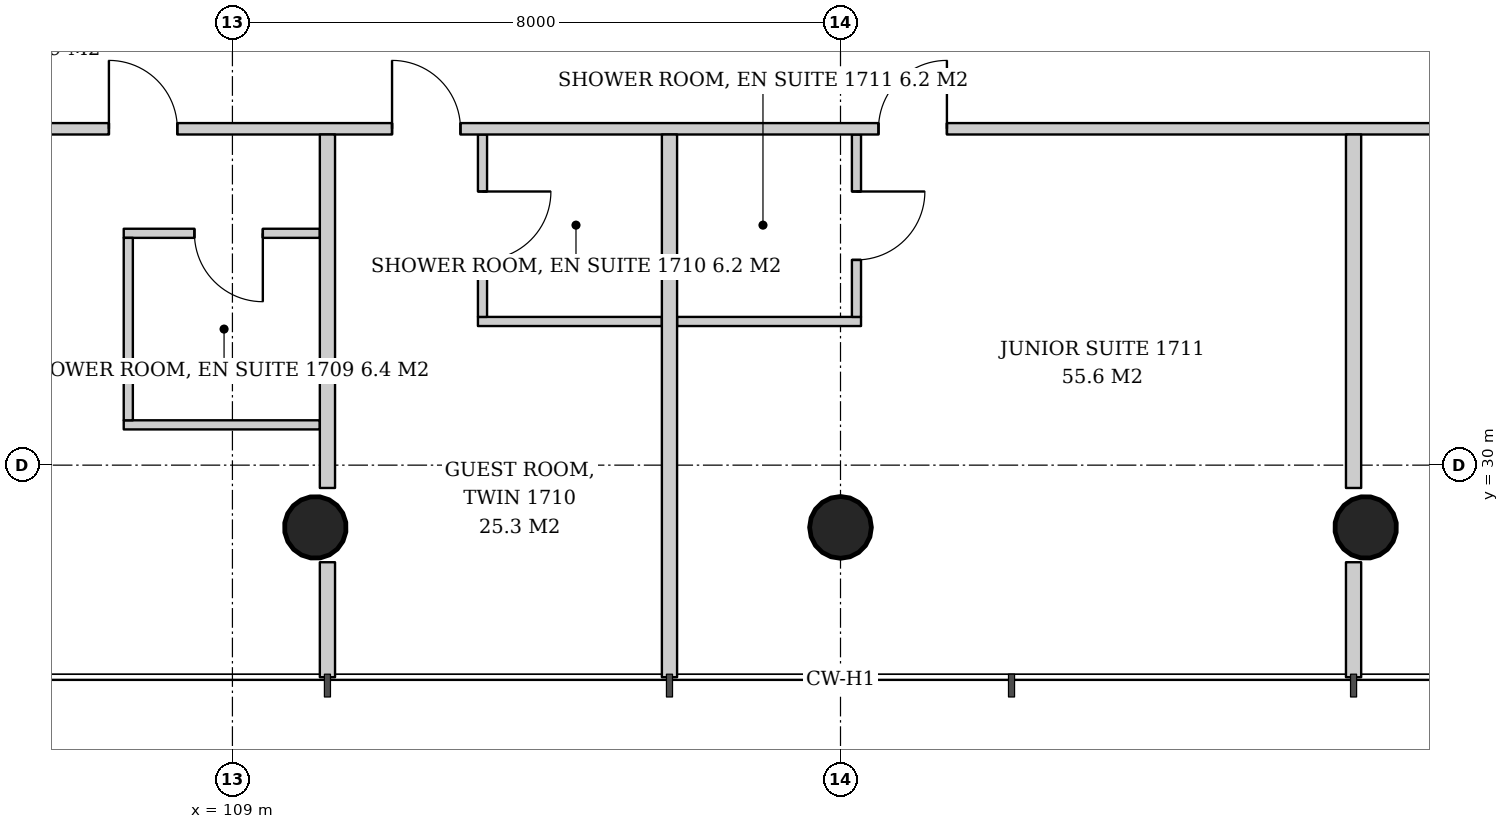
"""IFC4 building model, lengths in metres.
Left out: names, types, materials, properties, quantities, classifications, styles, units other than length and angle.
Written with IfcOpenShell. Run it as: python <this file> out.ifc"""

import sys

from ifc_helpers import new_model, si_unit, direction, frame, frame_2d, origin, origin_2d, place, context, subcontext, project, spatial, rectangle, hollow_circle, extrude, element, fill, save


model = new_model("IFC4")
c1 = context("Model", 3, precision=1e-05, world=origin(), true_north=direction((0.0, 1.0)))
c2 = subcontext(c1, "Body", "Model", "MODEL_VIEW")
j1 = project(units=[si_unit("LENGTHUNIT", "METRE"), si_unit("PLANEANGLEUNIT", "RADIAN")], contexts=[c1])
p1 = place(None, origin())
s1 = spatial("IfcSite", under=j1, at=p1, CompositionType="ELEMENT")
p2 = place(p1, origin())
s2 = spatial("IfcBuilding", under=s1, at=p2, CompositionType="ELEMENT")
p3 = place(p2, frame((0.0, 0.0, 70.4)))
s3 = spatial("IfcBuildingStorey", under=s2, at=p3, CompositionType="ELEMENT", Elevation=70.4)
p4 = place(p3, frame((110.065, 29.129, 0.0), z_axis=(0.021497706284, 0.043059584825, 0.998841188968), x_axis=(-0.894693706707, 0.446680166538, 0.0)))
e1 = element("IfcColumn", 1, at=p4, inside=s3, PredefinedType="COLUMN", context=c2, shape_type="SweptSolid", body=[
    extrude(hollow_circle(Radius=0.406, WallThickness=0.03, at=origin_2d()), origin(), (0.0, 0.0, 1.0), 3.804),
])
p5 = place(p3, frame((117.0, 29.129, 0.0), z_axis=(0.0, 0.043069538298, 0.999072076915), x_axis=(-1.0, 0.0, 0.0)))
e2 = element("IfcColumn", 2, at=p5, inside=s3, PredefinedType="COLUMN", context=c2, shape_type="SweptSolid", body=[
    extrude(hollow_circle(Radius=0.406, WallThickness=0.03, at=origin_2d()), origin(), (0.0, 0.0, 1.0), 3.803),
])
p6 = place(p3, frame((123.935, 29.129, 0.0), z_axis=(-0.021497706284, 0.043059584825, 0.998841188968), x_axis=(-0.894693706707, -0.446680166538, 0.0)))
e3 = element("IfcColumn", 3, at=p6, inside=s3, PredefinedType="COLUMN", context=c2, shape_type="SweptSolid", body=[
    extrude(hollow_circle(Radius=0.406, WallThickness=0.03, at=origin_2d()), origin(), (0.0, 0.0, 1.0), 3.804),
])
p7 = place(p3, frame((110.15, 33.05, 0.0), z_axis=(0.0, 0.0, 1.0), x_axis=(-1.0, 0.0, 0.0)))
e4 = element("IfcWall", 4, at=p7, inside=s3, PredefinedType="PARTITIONING", context=c2, shape_type="SweptSolid", body=[
    extrude(rectangle(XDim=2.58, YDim=0.12, at=frame_2d((1.29, 0.0))), origin(), (0.0, 0.0, 1.0), 2.8),
])
p8 = place(p7, frame((0.75, 0.0, 0.0)))
e5 = element("IfcOpeningElement", 5, at=p8, cuts=e4, PredefinedType="OPENING", context=c2, shape_type="SweptSolid", body=[
    extrude(rectangle(XDim=0.9, YDim=2.1, at=frame_2d((0.45, 1.05))), frame((0.0, 0.07, 0.0), z_axis=(0.0, -1.0, 0.0), x_axis=(1.0, 0.0, 0.0)), (0.0, 0.0, 1.0), 0.14),
])
p9 = place(p3, frame((110.15, 30.53, 0.0), z_axis=(0.0, 0.0, 1.0), x_axis=(-1.0, 0.0, 0.0)))
e6 = element("IfcWall", 6, at=p9, inside=s3, PredefinedType="PARTITIONING", context=c2, shape_type="SweptSolid", body=[
    extrude(rectangle(XDim=2.58, YDim=0.12, at=frame_2d((1.29, 0.0))), origin(), (0.0, 0.0, 1.0), 2.8),
])
p10 = place(p3, frame((107.63, 32.99, 0.0), z_axis=(0.0, 0.0, 1.0), x_axis=(0.0, -1.0, 0.0)))
e7 = element("IfcWall", 7, at=p10, inside=s3, PredefinedType="PARTITIONING", context=c2, shape_type="SweptSolid", body=[
    extrude(rectangle(XDim=2.4, YDim=0.12, at=frame_2d((1.2, 0.0))), origin(), (0.0, 0.0, 1.0), 2.8),
])
p11 = place(p3, frame((112.23, 31.89, 0.0), z_axis=(0.0, 0.0, 1.0), x_axis=(1.0, 0.0, 0.0)))
e8 = element("IfcWall", 8, at=p11, inside=s3, PredefinedType="PARTITIONING", context=c2, shape_type="SweptSolid", body=[
    extrude(rectangle(XDim=2.42, YDim=0.12, at=frame_2d((1.21, 0.0))), origin(), (0.0, 0.0, 1.0), 2.847),
])
p12 = place(p3, frame((112.29, 34.35, 0.0), z_axis=(0.0, 0.0, 1.0), x_axis=(0.0, -1.0, 0.0)))
e9 = element("IfcWall", 9, at=p12, inside=s3, PredefinedType="PARTITIONING", context=c2, shape_type="SweptSolid", body=[
    extrude(rectangle(XDim=2.4, YDim=0.12, at=frame_2d((1.2, 0.0))), origin(), (0.0, 0.0, 1.0), 2.847),
])
p13 = place(p12, frame((0.75, 0.0, 0.0)))
e10 = element("IfcOpeningElement", 10, at=p13, cuts=e9, PredefinedType="OPENING", context=c2, shape_type="SweptSolid", body=[
    extrude(rectangle(XDim=0.9, YDim=2.1, at=frame_2d((0.45, 1.05))), frame((0.0, 0.07, 0.0), z_axis=(0.0, -1.0, 0.0), x_axis=(1.0, 0.0, 0.0)), (0.0, 0.0, 1.0), 0.14),
])
p14 = place(p3, frame((114.85, 31.89, 0.0), z_axis=(0.0, 0.0, 1.0), x_axis=(1.0, 0.0, 0.0)))
e11 = element("IfcWall", 11, at=p14, inside=s3, PredefinedType="PARTITIONING", context=c2, shape_type="SweptSolid", body=[
    extrude(rectangle(XDim=2.42, YDim=0.12, at=frame_2d((1.21, 0.0))), origin(), (0.0, 0.0, 1.0), 2.847),
])
p15 = place(p3, frame((117.21, 34.35, 0.0), z_axis=(0.0, 0.0, 1.0), x_axis=(0.0, -1.0, 0.0)))
e12 = element("IfcWall", 12, at=p15, inside=s3, PredefinedType="PARTITIONING", context=c2, shape_type="SweptSolid", body=[
    extrude(rectangle(XDim=2.4, YDim=0.12, at=frame_2d((1.2, 0.0))), origin(), (0.0, 0.0, 1.0), 3.6),
])
p16 = place(p15, frame((0.75, 0.0, 0.0)))
e13 = element("IfcOpeningElement", 13, at=p16, cuts=e12, PredefinedType="OPENING", context=c2, shape_type="SweptSolid", body=[
    extrude(rectangle(XDim=0.9, YDim=2.1, at=frame_2d((0.45, 1.05))), frame((0.0, 0.07, 0.0), z_axis=(0.0, -1.0, 0.0), x_axis=(1.0, 0.0, 0.0)), (0.0, 0.0, 1.0), 0.14),
])
p17 = place(p3, frame((105.35, 34.425, 0.0), z_axis=(0.0, 0.0, 1.0), x_axis=(1.0, 0.0, 0.0)))
e14 = element("IfcWall", 14, at=p17, inside=s3, PredefinedType="PARTITIONING", context=c2, shape_type="SweptSolid", body=[
    extrude(rectangle(XDim=23.15, YDim=0.15, at=frame_2d((11.575, 0.0))), origin(), (0.0, 0.0, 1.0), 2.8),
])
p18 = place(p17, frame((2.025, 0.0, 0.0)))
e15 = element("IfcOpeningElement", 15, at=p18, cuts=e14, PredefinedType="OPENING", context=c2, shape_type="SweptSolid", body=[
    extrude(rectangle(XDim=0.9, YDim=2.1, at=frame_2d((0.45, 1.05))), frame((0.0, 0.085, 0.0), z_axis=(0.0, -1.0, 0.0), x_axis=(1.0, 0.0, 0.0)), (0.0, 0.0, 1.0), 0.17),
])
p19 = place(p17, frame((5.75, 0.0, 0.0)))
e16 = element("IfcOpeningElement", 16, at=p19, cuts=e14, PredefinedType="OPENING", context=c2, shape_type="SweptSolid", body=[
    extrude(rectangle(XDim=0.9, YDim=2.1, at=frame_2d((0.45, 1.05))), frame((0.0, 0.085, 0.0), z_axis=(0.0, -1.0, 0.0), x_axis=(1.0, 0.0, 0.0)), (0.0, 0.0, 1.0), 0.17),
])
p20 = place(p17, frame((12.15, 0.0, 0.0)))
e17 = element("IfcOpeningElement", 17, at=p20, cuts=e14, PredefinedType="OPENING", context=c2, shape_type="SweptSolid", body=[
    extrude(rectangle(XDim=0.9, YDim=2.1, at=frame_2d((0.45, 1.05))), frame((0.0, 0.085, 0.0), z_axis=(0.0, -1.0, 0.0), x_axis=(1.0, 0.0, 0.0)), (0.0, 0.0, 1.0), 0.17),
])
p21 = place(p3, frame((110.25, 34.35, 0.0), z_axis=(0.0, 0.0, 1.0), x_axis=(0.0, -1.0, 0.0)))
e18 = element("IfcWall", 18, at=p21, inside=s3, PredefinedType="PARTITIONING", context=c2, shape_type="SweptSolid", body=[
    extrude(rectangle(XDim=4.65, YDim=0.2, at=frame_2d((2.325, 0.0))), origin(), (0.0, 0.0, 1.0), 3.6),
])
p22 = place(p3, frame((110.25, 28.723, 0.0), z_axis=(0.0, 0.0, 1.0), x_axis=(0.0, -1.0, 0.0)))
e19 = element("IfcWall", 19, at=p22, inside=s3, PredefinedType="PARTITIONING", context=c2, shape_type="SweptSolid", body=[
    extrude(rectangle(XDim=1.513, YDim=0.2, at=frame_2d((0.756, 0.0))), origin(), (0.0, 0.0, 1.0), 3.6),
])
p23 = place(p3, frame((114.75, 34.35, 0.0), z_axis=(0.0, 0.0, 1.0), x_axis=(0.0, -1.0, 0.0)))
e20 = element("IfcWall", 20, at=p23, inside=s3, PredefinedType="PARTITIONING", context=c2, shape_type="SweptSolid", body=[
    extrude(rectangle(XDim=7.14, YDim=0.2, at=frame_2d((3.57, 0.0))), origin(), (0.0, 0.0, 1.0), 3.05),
])
p24 = place(p3, frame((123.75, 34.35, 0.0), z_axis=(0.0, 0.0, 1.0), x_axis=(0.0, -1.0, 0.0)))
e21 = element("IfcWall", 21, at=p24, inside=s3, PredefinedType="PARTITIONING", context=c2, shape_type="SweptSolid", body=[
    extrude(rectangle(XDim=4.65, YDim=0.2, at=frame_2d((2.325, 0.0))), origin(), (0.0, 0.0, 1.0), 3.6),
])
p25 = place(p3, frame((123.75, 28.723, 0.0), z_axis=(0.0, 0.0, 1.0), x_axis=(0.0, -1.0, 0.0)))
e22 = element("IfcWall", 22, at=p25, inside=s3, PredefinedType="PARTITIONING", context=c2, shape_type="SweptSolid", body=[
    extrude(rectangle(XDim=1.513, YDim=0.2, at=frame_2d((0.756, 0.0))), origin(), (0.0, 0.0, 1.0), 3.6),
])
p26 = place(p8, origin())
e23 = element("IfcDoor", 23, at=p26, inside=s3, OperationType="SINGLE_SWING_LEFT", PredefinedType="DOOR", context=c2, shape_type="SweptSolid", body=[
    extrude(rectangle(XDim=0.9, YDim=2.1, at=frame_2d((0.45, 1.05))), frame((0.0, 0.025, 0.0), z_axis=(0.0, -1.0, 0.0), x_axis=(1.0, 0.0, 0.0)), (0.0, 0.0, 1.0), 0.05),
])
fill(e5, e23)
p27 = place(p13, origin())
e24 = element("IfcDoor", 24, at=p27, inside=s3, OperationType="SINGLE_SWING_LEFT", PredefinedType="DOOR", context=c2, shape_type="SweptSolid", body=[
    extrude(rectangle(XDim=0.9, YDim=2.1, at=frame_2d((0.45, 1.05))), frame((0.0, 0.025, 0.0), z_axis=(0.0, -1.0, 0.0), x_axis=(1.0, 0.0, 0.0)), (0.0, 0.0, 1.0), 0.05),
])
fill(e10, e24)
p28 = place(p16, origin())
e25 = element("IfcDoor", 25, at=p28, inside=s3, OperationType="SINGLE_SWING_LEFT", PredefinedType="DOOR", context=c2, shape_type="SweptSolid", body=[
    extrude(rectangle(XDim=0.9, YDim=2.1, at=frame_2d((0.45, 1.05))), frame((0.0, 0.025, 0.0), z_axis=(0.0, -1.0, 0.0), x_axis=(1.0, 0.0, 0.0)), (0.0, 0.0, 1.0), 0.05),
])
fill(e13, e25)
p29 = place(p18, origin())
e26 = element("IfcDoor", 26, at=p29, inside=s3, OperationType="SINGLE_SWING_LEFT", PredefinedType="DOOR", context=c2, shape_type="SweptSolid", body=[
    extrude(rectangle(XDim=0.9, YDim=2.1, at=frame_2d((0.45, 1.05))), frame((0.0, 0.025, 0.0), z_axis=(0.0, -1.0, 0.0), x_axis=(1.0, 0.0, 0.0)), (0.0, 0.0, 1.0), 0.05),
])
fill(e15, e26)
p30 = place(p19, origin())
e27 = element("IfcDoor", 27, at=p30, inside=s3, OperationType="SINGLE_SWING_LEFT", PredefinedType="DOOR", context=c2, shape_type="SweptSolid", body=[
    extrude(rectangle(XDim=0.9, YDim=2.1, at=frame_2d((0.45, 1.05))), frame((0.0, 0.025, 0.0), z_axis=(0.0, -1.0, 0.0), x_axis=(1.0, 0.0, 0.0)), (0.0, 0.0, 1.0), 0.05),
])
fill(e16, e27)
p31 = place(p20, origin())
e28 = element("IfcDoor", 28, at=p31, inside=s3, OperationType="SINGLE_SWING_RIGHT", PredefinedType="DOOR", context=c2, shape_type="SweptSolid", body=[
    extrude(rectangle(XDim=0.9, YDim=2.1, at=frame_2d((0.45, 1.05))), frame((0.0, 0.025, 0.0), z_axis=(0.0, -1.0, 0.0), x_axis=(1.0, 0.0, 0.0)), (0.0, 0.0, 1.0), 0.05),
])
fill(e17, e28)
save(model, sys.argv[1])
